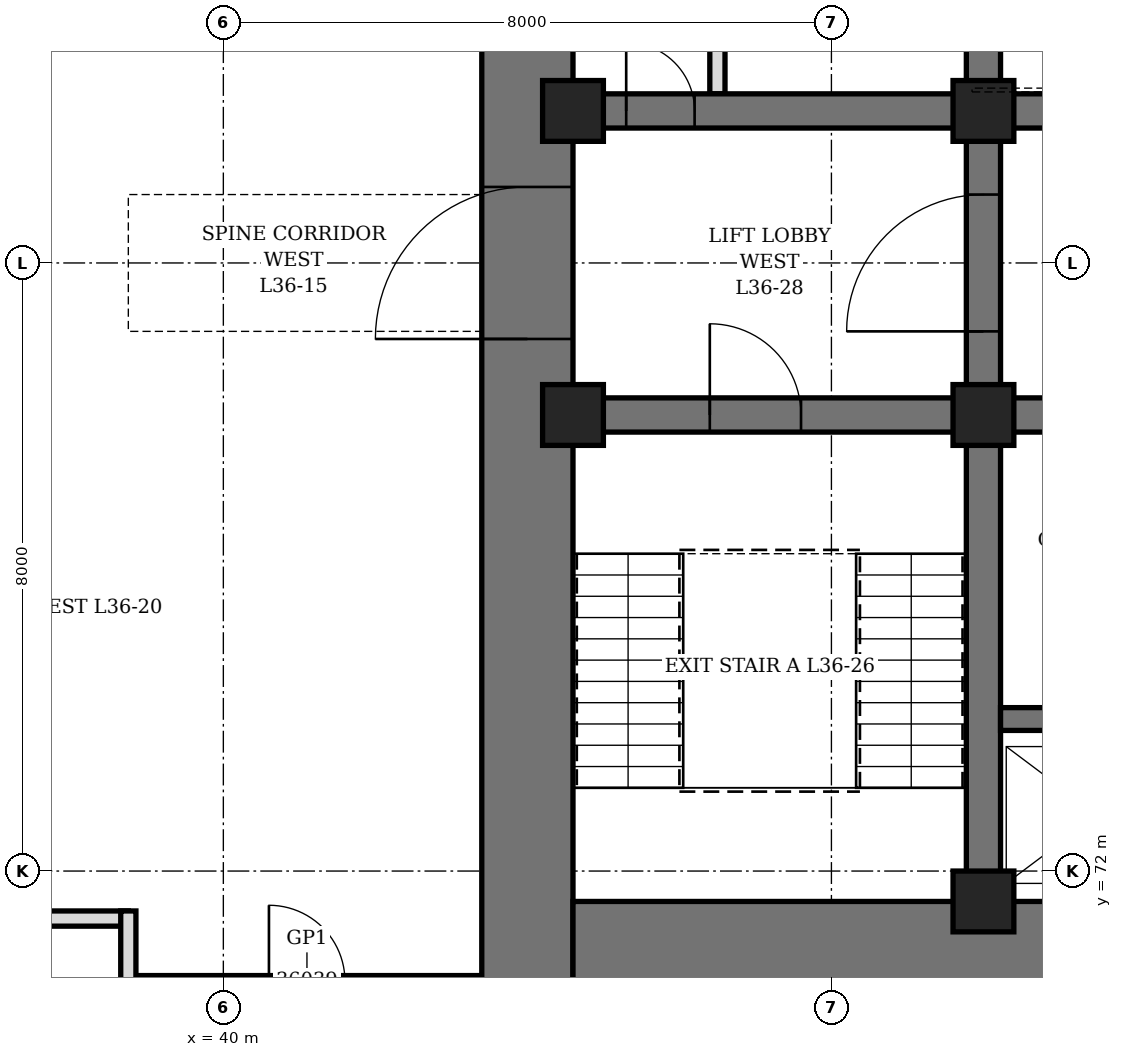
"""IFC4 building model, lengths in metres.
Left out: names, types, materials, properties, quantities, classifications, styles, units other than length and angle.
Written with IfcOpenShell. Run it as: python <this file> out.ifc"""

import sys

from ifc_helpers import new_model, si_unit, direction, frame, frame_2d, origin, origin_2d, place, context, subcontext, project, spatial, rectangle, hollow_rectangle, extrude, element, fill, save


model = new_model("IFC4")
c1 = context("Model", 3, precision=1e-05, world=origin(), true_north=direction((0.0, 1.0)))
c2 = subcontext(c1, "Body", "Model", "MODEL_VIEW")
j1 = project(units=[si_unit("LENGTHUNIT", "METRE"), si_unit("PLANEANGLEUNIT", "RADIAN")], contexts=[c1])
p1 = place(None, origin())
s1 = spatial("IfcSite", under=j1, at=p1, CompositionType="ELEMENT")
p2 = place(p1, origin())
s2 = spatial("IfcBuilding", under=s1, at=p2, CompositionType="ELEMENT")
p3 = place(p2, frame((0.0, 0.0, 162.7)))
s3 = spatial("IfcBuildingStorey", under=s2, at=p3, CompositionType="ELEMENT", Elevation=162.7)
p4 = place(p3, frame((44.0, 70.4, 0.0), z_axis=(0.0, 0.0, 1.0), x_axis=(0.0, 1.0, 0.0)))
e1 = element("IfcWall", 1, at=p4, inside=s3, PredefinedType="SHEAR", context=c2, shape_type="SweptSolid", body=[
    extrude(rectangle(XDim=19.2, YDim=1.2, at=frame_2d((9.6, 0.0))), origin(), (0.0, 0.0, 1.0), 4.2),
])
p5 = place(p4, frame((8.6, 0.0, 0.0)))
e2 = element("IfcOpeningElement", 2, at=p5, cuts=e1, PredefinedType="OPENING", context=c2, shape_type="SweptSolid", body=[
    extrude(rectangle(XDim=2.0, YDim=2.4, at=frame_2d((1.0, 1.2))), frame((0.0, 0.61, 0.0), z_axis=(0.0, -1.0, 0.0), x_axis=(1.0, 0.0, 0.0)), (0.0, 0.0, 1.0), 1.22),
])
p6 = place(p3, frame((44.6, 71.0, 0.0), z_axis=(0.0, 0.0, 1.0), x_axis=(1.0, 0.0, 0.0)))
e3 = element("IfcWall", 3, at=p6, inside=s3, PredefinedType="SHEAR", context=c2, shape_type="SweptSolid", body=[
    extrude(rectangle(XDim=22.8, YDim=1.2, at=frame_2d((11.4, 0.0))), origin(), (0.0, 0.0, 1.0), 4.2),
])
p7 = place(p3, frame((50.0, 71.6, 0.0), z_axis=(0.0, 0.0, 1.0), x_axis=(0.0, 1.0, 0.0)))
e4 = element("IfcWall", 4, at=p7, inside=s3, PredefinedType="SHEAR", context=c2, shape_type="SweptSolid", body=[
    extrude(rectangle(XDim=16.8, YDim=0.45, at=frame_2d((8.4, 0.0))), origin(), (0.0, 0.0, 1.0), 4.2),
])
p8 = place(p7, frame((7.5, 0.0, 0.0)))
e5 = element("IfcOpeningElement", 5, at=p8, cuts=e4, PredefinedType="OPENING", context=c2, shape_type="SweptSolid", body=[
    extrude(rectangle(XDim=1.8, YDim=2.4, at=frame_2d((0.9, 1.2))), frame((0.0, 0.235, 0.0), z_axis=(0.0, -1.0, 0.0), x_axis=(1.0, 0.0, 0.0)), (0.0, 0.0, 1.0), 0.47),
])
p9 = place(p3, frame((44.6, 78.0, 0.0), z_axis=(0.0, 0.0, 1.0), x_axis=(1.0, 0.0, 0.0)))
e6 = element("IfcWall", 6, at=p9, inside=s3, PredefinedType="SHEAR", context=c2, shape_type="SweptSolid", body=[
    extrude(rectangle(XDim=5.175, YDim=0.45, at=frame_2d((2.587, 0.0))), origin(), (0.0, 0.0, 1.0), 4.2),
])
p10 = place(p9, frame((1.8, 0.0, 0.0)))
e7 = element("IfcOpeningElement", 7, at=p10, cuts=e6, PredefinedType="OPENING", context=c2, shape_type="SweptSolid", body=[
    extrude(rectangle(XDim=1.2, YDim=2.1, at=frame_2d((0.6, 1.05))), frame((0.0, 0.235, 0.0), z_axis=(0.0, -1.0, 0.0), x_axis=(1.0, 0.0, 0.0)), (0.0, 0.0, 1.0), 0.47),
])
p11 = place(p3, frame((44.6, 82.0, 0.0), z_axis=(0.0, 0.0, 1.0), x_axis=(1.0, 0.0, 0.0)))
e8 = element("IfcWall", 8, at=p11, inside=s3, PredefinedType="SHEAR", context=c2, shape_type="SweptSolid", body=[
    extrude(rectangle(XDim=5.175, YDim=0.45, at=frame_2d((2.587, 0.0))), origin(), (0.0, 0.0, 1.0), 4.2),
])
p12 = place(p11, frame((0.7, 0.0, 0.0)))
e9 = element("IfcOpeningElement", 9, at=p12, cuts=e8, PredefinedType="OPENING", context=c2, shape_type="SweptSolid", body=[
    extrude(rectangle(XDim=0.9, YDim=2.1, at=frame_2d((0.45, 1.05))), frame((0.0, 0.235, 0.0), z_axis=(0.0, -1.0, 0.0), x_axis=(1.0, 0.0, 0.0)), (0.0, 0.0, 1.0), 0.47),
])
p13 = place(p3, frame((50.225, 78.0, 0.0), z_axis=(0.0, 0.0, 1.0), x_axis=(1.0, 0.0, 0.0)))
e10 = element("IfcWall", 10, at=p13, inside=s3, PredefinedType="SHEAR", context=c2, shape_type="SweptSolid", body=[
    extrude(rectangle(XDim=11.55, YDim=0.45, at=frame_2d((5.775, 0.0))), origin(), (0.0, 0.0, 1.0), 4.2),
])
p14 = place(p13, frame((0.825, 0.0, 0.0)))
e11 = element("IfcOpeningElement", 11, at=p14, cuts=e10, PredefinedType="OPENING", context=c2, shape_type="SweptSolid", body=[
    extrude(rectangle(XDim=0.9, YDim=2.1, at=frame_2d((0.45, 1.05))), frame((0.0, 0.235, 0.0), z_axis=(0.0, -1.0, 0.0), x_axis=(1.0, 0.0, 0.0)), (0.0, 0.0, 1.0), 0.47),
])
p15 = place(p13, frame((3.825, 0.0, 0.0)))
e12 = element("IfcOpeningElement", 12, at=p15, cuts=e10, PredefinedType="OPENING", context=c2, shape_type="SweptSolid", body=[
    extrude(rectangle(XDim=0.9, YDim=2.1, at=frame_2d((0.45, 1.05))), frame((0.0, 0.235, 0.0), z_axis=(0.0, -1.0, 0.0), x_axis=(1.0, 0.0, 0.0)), (0.0, 0.0, 1.0), 0.47),
])
p16 = place(p13, frame((6.825, 0.0, 0.0)))
e13 = element("IfcOpeningElement", 13, at=p16, cuts=e10, PredefinedType="OPENING", context=c2, shape_type="SweptSolid", body=[
    extrude(rectangle(XDim=0.9, YDim=2.1, at=frame_2d((0.45, 1.05))), frame((0.0, 0.235, 0.0), z_axis=(0.0, -1.0, 0.0), x_axis=(1.0, 0.0, 0.0)), (0.0, 0.0, 1.0), 0.47),
])
p17 = place(p13, frame((9.825, 0.0, 0.0)))
e14 = element("IfcOpeningElement", 14, at=p17, cuts=e10, PredefinedType="OPENING", context=c2, shape_type="SweptSolid", body=[
    extrude(rectangle(XDim=0.9, YDim=2.1, at=frame_2d((0.45, 1.05))), frame((0.0, 0.235, 0.0), z_axis=(0.0, -1.0, 0.0), x_axis=(1.0, 0.0, 0.0)), (0.0, 0.0, 1.0), 0.47),
])
p18 = place(p3, frame((50.225, 82.0, 0.0), z_axis=(0.0, 0.0, 1.0), x_axis=(1.0, 0.0, 0.0)))
e15 = element("IfcWall", 15, at=p18, inside=s3, PredefinedType="SHEAR", context=c2, shape_type="SweptSolid", body=[
    extrude(rectangle(XDim=11.55, YDim=0.45, at=frame_2d((5.775, 0.0))), origin(), (0.0, 0.0, 1.0), 4.2),
])
p19 = place(p18, frame((0.725, 0.0, 0.0)))
e16 = element("IfcOpeningElement", 16, at=p19, cuts=e15, PredefinedType="OPENING", context=c2, shape_type="SweptSolid", body=[
    extrude(rectangle(XDim=1.1, YDim=2.2, at=frame_2d((0.55, 1.1))), frame((0.0, 0.235, 0.0), z_axis=(0.0, -1.0, 0.0), x_axis=(1.0, 0.0, 0.0)), (0.0, 0.0, 1.0), 0.47),
])
p20 = place(p18, frame((3.725, 0.0, 0.0)))
e17 = element("IfcOpeningElement", 17, at=p20, cuts=e15, PredefinedType="OPENING", context=c2, shape_type="SweptSolid", body=[
    extrude(rectangle(XDim=1.1, YDim=2.2, at=frame_2d((0.55, 1.1))), frame((0.0, 0.235, 0.0), z_axis=(0.0, -1.0, 0.0), x_axis=(1.0, 0.0, 0.0)), (0.0, 0.0, 1.0), 0.47),
])
p21 = place(p18, frame((6.725, 0.0, 0.0)))
e18 = element("IfcOpeningElement", 18, at=p21, cuts=e15, PredefinedType="OPENING", context=c2, shape_type="SweptSolid", body=[
    extrude(rectangle(XDim=1.1, YDim=2.2, at=frame_2d((0.55, 1.1))), frame((0.0, 0.235, 0.0), z_axis=(0.0, -1.0, 0.0), x_axis=(1.0, 0.0, 0.0)), (0.0, 0.0, 1.0), 0.47),
])
p22 = place(p18, frame((9.725, 0.0, 0.0)))
e19 = element("IfcOpeningElement", 19, at=p22, cuts=e15, PredefinedType="OPENING", context=c2, shape_type="SweptSolid", body=[
    extrude(rectangle(XDim=1.1, YDim=2.2, at=frame_2d((0.55, 1.1))), frame((0.0, 0.235, 0.0), z_axis=(0.0, -1.0, 0.0), x_axis=(1.0, 0.0, 0.0)), (0.0, 0.0, 1.0), 0.47),
])
p23 = place(p3, frame((50.225, 74.0, 0.0), z_axis=(0.0, 0.0, 1.0), x_axis=(1.0, 0.0, 0.0)))
e20 = element("IfcWall", 20, at=p23, inside=s3, PredefinedType="SHEAR", context=c2, shape_type="SweptSolid", body=[
    extrude(rectangle(XDim=11.55, YDim=0.3, at=frame_2d((5.775, 0.0))), origin(), (0.0, 0.0, 1.0), 4.2),
])
for number, where, z_axis, x_axis in (
    (21, (44.6, 78.0, 0.0), (0.0, 0.0, 1.0), (1.0, 0.0, 0.0)),
    (22, (44.6, 82.0, 0.0), (0.0, 0.0, 1.0), (1.0, 0.0, 0.0)),
    (23, (50.0, 71.6, 0.0), (0.0, 0.0, 1.0), (1.0, 0.0, 0.0)),
    (24, (50.0, 78.0, 0.0), (0.0, 0.0, 1.0), (1.0, 0.0, 0.0)),
    (25, (50.0, 82.0, 0.0), (0.0, 0.0, 1.0), (1.0, 0.0, 0.0)),
):
    element("IfcColumn", number, at=place(p3, frame(where, z_axis=z_axis, x_axis=x_axis)), inside=s3, PredefinedType="COLUMN", context=c2, shape_type="SweptSolid", body=[
        extrude(hollow_rectangle(XDim=0.8, YDim=0.8, WallThickness=0.1, at=origin_2d()), origin(), (0.0, 0.0, 1.0), 4.2),
    ])
p24 = place(p3, frame((46.5, 82.225, 0.0), z_axis=(0.0, 0.0, 1.0), x_axis=(0.0, 1.0, 0.0)))
e26 = element("IfcWall", 26, at=p24, inside=s3, PredefinedType="PARTITIONING", context=c2, shape_type="SweptSolid", body=[
    extrude(rectangle(XDim=3.05, YDim=0.2, at=frame_2d((1.525, 0.0))), origin(), (0.0, 0.0, 1.0), 4.04),
])
p25 = place(p24, frame((1.075, 0.0, 0.0)))
e27 = element("IfcOpeningElement", 27, at=p25, cuts=e26, PredefinedType="OPENING", context=c2, shape_type="SweptSolid", body=[
    extrude(rectangle(XDim=0.9, YDim=2.1, at=frame_2d((0.45, 1.05))), frame((0.0, 0.11, 0.0), z_axis=(0.0, -1.0, 0.0), x_axis=(1.0, 0.0, 0.0)), (0.0, 0.0, 1.0), 0.22),
])
p26 = place(p3, frame((33.95, 71.375, 0.0), z_axis=(0.0, 0.0, 1.0), x_axis=(1.0, 0.0, 0.0)))
e28 = element("IfcWall", 28, at=p26, inside=s3, PredefinedType="PARTITIONING", context=c2, shape_type="SweptSolid", body=[
    extrude(rectangle(XDim=4.8, YDim=0.2, at=frame_2d((2.4, 0.0))), origin(), (0.0, 0.0, 1.0), 3.428),
])
p27 = place(p3, frame((38.8, 70.55, 0.0), z_axis=(0.0, 0.0, 1.0), x_axis=(1.0, 0.0, 0.0)))
e29 = element("IfcWall", 29, at=p27, inside=s3, PredefinedType="PARTITIONING", context=c2, shape_type="SweptSolid", body=[
    extrude(rectangle(XDim=4.6, YDim=0.15, at=frame_2d((2.3, 0.0))), origin(), (0.0, 0.0, 1.0), 4.04),
])
p28 = place(p27, frame((1.8, 0.0, 0.0)))
e30 = element("IfcOpeningElement", 30, at=p28, cuts=e29, PredefinedType="OPENING", context=c2, shape_type="SweptSolid", body=[
    extrude(rectangle(XDim=1.0, YDim=2.4, at=frame_2d((0.5, 1.2))), frame((0.0, 0.085, 0.0), z_axis=(0.0, -1.0, 0.0), x_axis=(1.0, 0.0, 0.0)), (0.0, 0.0, 1.0), 0.17),
])
p29 = place(p3, frame((38.75, 63.2, 0.0), z_axis=(0.0, 0.0, 1.0), x_axis=(0.0, 1.0, 0.0)))
e31 = element("IfcWall", 31, at=p29, inside=s3, PredefinedType="PARTITIONING", context=c2, shape_type="SweptSolid", body=[
    extrude(rectangle(XDim=8.275, YDim=0.2, at=frame_2d((4.138, 0.0))), origin(), (0.0, 0.0, 1.0), 4.04),
])
p30 = place(p29, frame((0.488, 0.0, 0.0)))
e32 = element("IfcOpeningElement", 32, at=p30, cuts=e31, PredefinedType="OPENING", context=c2, shape_type="SweptSolid", body=[
    extrude(rectangle(XDim=1.0, YDim=2.1, at=frame_2d((0.5, 1.05))), frame((0.0, 0.11, 0.0), z_axis=(0.0, -1.0, 0.0), x_axis=(1.0, 0.0, 0.0)), (0.0, 0.0, 1.0), 0.22),
])
p31 = place(p29, frame((6.05, 0.0, 0.0)))
e33 = element("IfcOpeningElement", 33, at=p31, cuts=e31, PredefinedType="OPENING", context=c2, shape_type="SweptSolid", body=[
    extrude(rectangle(XDim=1.0, YDim=2.1, at=frame_2d((0.5, 1.05))), frame((0.0, 0.11, 0.0), z_axis=(0.0, -1.0, 0.0), x_axis=(1.0, 0.0, 0.0)), (0.0, 0.0, 1.0), 0.22),
])
p32 = place(p12, origin())
e34 = element("IfcDoor", 34, at=p32, inside=s3, OperationType="SINGLE_SWING_LEFT", PredefinedType="DOOR", context=c2, shape_type="SweptSolid", body=[
    extrude(rectangle(XDim=0.9, YDim=2.1, at=frame_2d((0.45, 1.05))), frame((0.0, 0.225, 0.0), z_axis=(0.0, -1.0, 0.0), x_axis=(1.0, 0.0, 0.0)), (0.0, 0.0, 1.0), 0.449),
])
fill(e9, e34)
p33 = place(p10, origin())
e35 = element("IfcDoor", 35, at=p33, inside=s3, OperationType="SINGLE_SWING_LEFT", PredefinedType="DOOR", context=c2, shape_type="SweptSolid", body=[
    extrude(rectangle(XDim=1.2, YDim=2.1, at=frame_2d((0.6, 1.05))), frame((0.0, 0.225, 0.0), z_axis=(0.0, -1.0, 0.0), x_axis=(1.0, 0.0, 0.0)), (0.0, 0.0, 1.0), 0.449),
])
fill(e7, e35)
p34 = place(p5, origin())
e36 = element("IfcDoor", 36, at=p34, inside=s3, OperationType="DOUBLE_DOOR_SINGLE_SWING", PredefinedType="DOOR", context=c2, shape_type="SweptSolid", body=[
    extrude(rectangle(XDim=2.0, YDim=2.4, at=frame_2d((1.0, 1.2))), frame((0.0, 0.35, 0.0), z_axis=(0.0, -1.0, 0.0), x_axis=(1.0, 0.0, 0.0)), (0.0, 0.0, 1.0), 0.7),
])
fill(e2, e36)
p35 = place(p8, origin())
e37 = element("IfcDoor", 37, at=p35, inside=s3, OperationType="DOUBLE_DOOR_SINGLE_SWING", PredefinedType="DOOR", context=c2, shape_type="SweptSolid", body=[
    extrude(rectangle(XDim=1.8, YDim=2.4, at=frame_2d((0.9, 1.2))), frame((0.0, 0.225, 0.0), z_axis=(0.0, -1.0, 0.0), x_axis=(1.0, 0.0, 0.0)), (0.0, 0.0, 1.0), 0.449),
])
fill(e5, e37)
p36 = place(p28, origin())
e38 = element("IfcDoor", 38, at=p36, inside=s3, OperationType="SINGLE_SWING_RIGHT", PredefinedType="DOOR", context=c2, shape_type="SweptSolid", body=[
    extrude(rectangle(XDim=1.0, YDim=2.4, at=frame_2d((0.5, 1.2))), frame((0.0, 0.075, 0.0), z_axis=(0.0, -1.0, 0.0), x_axis=(1.0, 0.0, 0.0)), (0.0, 0.0, 1.0), 0.149),
])
fill(e30, e38)
save(model, sys.argv[1])
